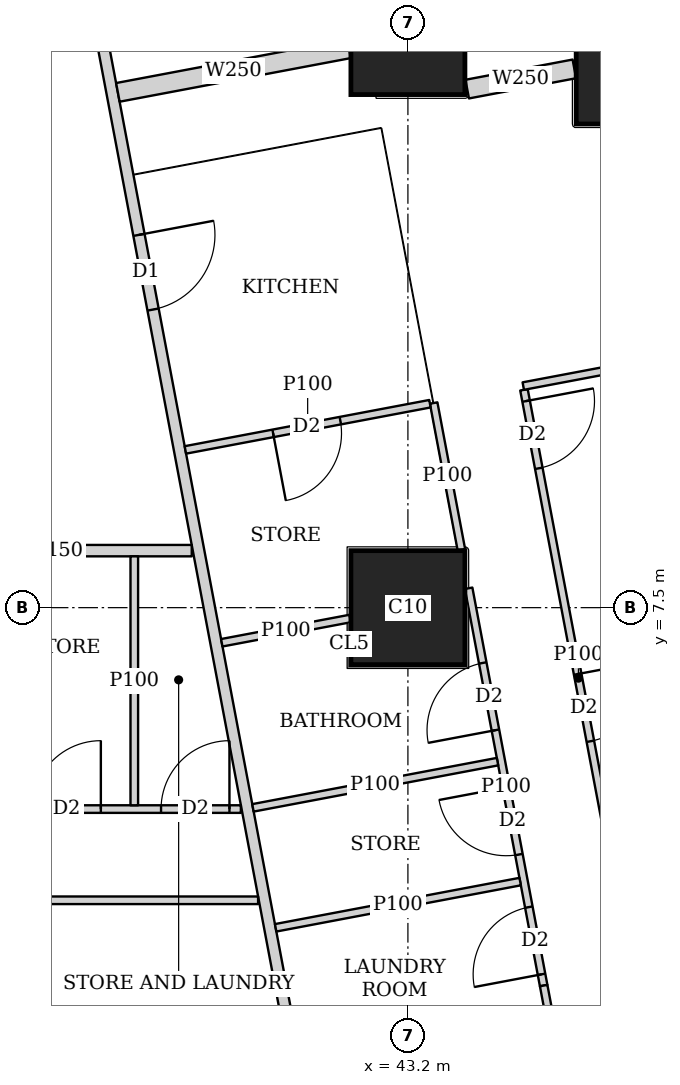
"""IFC4 building model, lengths in metres.
Left out: names, types, materials, properties, quantities, classifications, styles, units other than length and angle.
Written with IfcOpenShell. Run it as: python <this file> out.ifc"""

import sys

from ifc_helpers import new_model, si_unit, direction, frame, frame_2d, origin, origin_2d, place, context, subcontext, project, spatial, rectangle, extrude, element, fill, save


model = new_model("IFC4")
c1 = context("Model", 3, precision=1e-05, world=origin(), true_north=direction((0.0, 1.0)))
c2 = subcontext(c1, "Body", "Model", "MODEL_VIEW")
j1 = project(units=[si_unit("LENGTHUNIT", "METRE"), si_unit("PLANEANGLEUNIT", "RADIAN")], contexts=[c1])
p1 = place(None, origin())
s1 = spatial("IfcSite", under=j1, at=p1, CompositionType="ELEMENT")
p2 = place(p1, origin())
s2 = spatial("IfcBuilding", under=s1, at=p2, CompositionType="ELEMENT")
p3 = place(p2, frame((0.0, 0.0, 147.05)))
s3 = spatial("IfcBuildingStorey", under=s2, at=p3, CompositionType="ELEMENT", Elevation=147.05)
for number, where, z_axis, x_axis in (
    (1, (43.2, 7.5, 0.0), (0.0, 0.0, 1.0), (1.0, 0.0, 0.0)),
    (2, (43.2, 15.0, 0.0), (0.0, 0.0, 1.0), (1.0, 0.0, 0.0)),
):
    element("IfcColumn", number, at=place(p3, frame(where, z_axis=z_axis, x_axis=x_axis)), inside=s3, PredefinedType="COLUMN", context=c2, shape_type="SweptSolid", body=[
        extrude(rectangle(XDim=1.5, YDim=1.5, at=origin_2d()), origin(), (0.0, 0.0, 1.0), 3.75),
    ])
p4 = place(p3, frame((46.314, 14.763, 0.0), z_axis=(0.0, 0.0, 1.0), x_axis=(1.0, 0.0, 0.0)))
e3 = element("IfcColumn", 3, at=p4, inside=s3, PredefinedType="COLUMN", context=c2, shape_type="SweptSolid", body=[
    extrude(rectangle(XDim=1.8, YDim=1.8, at=origin_2d()), origin(), (0.0, 0.0, 1.0), 3.75),
])
p5 = place(p3, frame((50.653, 2.703, 0.0), z_axis=(0.0, 0.0, 1.0), x_axis=(-0.185612026696, 0.982623109613, 0.0)))
e4 = element("IfcWall", 4, at=p5, inside=s3, PredefinedType="SOLIDWALL", context=c2, shape_type="SweptSolid", body=[
    extrude(rectangle(XDim=41.393, YDim=0.2, at=frame_2d((20.697, 0.0))), origin(), (0.0, 0.0, 1.0), 3.5),
])
p6 = place(p5, frame((1.633, 0.0, 0.9)))
e5 = element("IfcOpeningElement", 5, at=p6, cuts=e4, PredefinedType="OPENING", context=c2, shape_type="SweptSolid", body=[
    extrude(rectangle(XDim=1.8, YDim=1.5, at=frame_2d((0.9, 0.75))), frame((0.0, 0.11, 0.0), z_axis=(0.0, -1.0, 0.0), x_axis=(1.0, 0.0, 0.0)), (0.0, 0.0, 1.0), 0.22),
])
p7 = place(p5, frame((6.032, 0.0, 0.9)))
e6 = element("IfcOpeningElement", 6, at=p7, cuts=e4, PredefinedType="OPENING", context=c2, shape_type="SweptSolid", body=[
    extrude(rectangle(XDim=1.8, YDim=1.5, at=frame_2d((0.9, 0.75))), frame((0.0, 0.11, 0.0), z_axis=(0.0, -1.0, 0.0), x_axis=(1.0, 0.0, 0.0)), (0.0, 0.0, 1.0), 0.22),
])
p8 = place(p5, frame((9.848, 0.0, 0.9)))
e7 = element("IfcOpeningElement", 7, at=p8, cuts=e4, PredefinedType="OPENING", context=c2, shape_type="SweptSolid", body=[
    extrude(rectangle(XDim=1.8, YDim=1.5, at=frame_2d((0.9, 0.75))), frame((0.0, 0.11, 0.0), z_axis=(0.0, -1.0, 0.0), x_axis=(1.0, 0.0, 0.0)), (0.0, 0.0, 1.0), 0.22),
])
p9 = place(p5, frame((13.664, 0.0, 0.9)))
e8 = element("IfcOpeningElement", 8, at=p9, cuts=e4, PredefinedType="OPENING", context=c2, shape_type="SweptSolid", body=[
    extrude(rectangle(XDim=1.8, YDim=1.5, at=frame_2d((0.9, 0.75))), frame((0.0, 0.11, 0.0), z_axis=(0.0, -1.0, 0.0), x_axis=(1.0, 0.0, 0.0)), (0.0, 0.0, 1.0), 0.22),
])
p10 = place(p5, frame((17.481, 0.0, 0.9)))
e9 = element("IfcOpeningElement", 9, at=p10, cuts=e4, PredefinedType="OPENING", context=c2, shape_type="SweptSolid", body=[
    extrude(rectangle(XDim=1.8, YDim=1.5, at=frame_2d((0.9, 0.75))), frame((0.0, 0.11, 0.0), z_axis=(0.0, -1.0, 0.0), x_axis=(1.0, 0.0, 0.0)), (0.0, 0.0, 1.0), 0.22),
])
p11 = place(p5, frame((21.297, 0.0, 0.9)))
e10 = element("IfcOpeningElement", 10, at=p11, cuts=e4, PredefinedType="OPENING", context=c2, shape_type="SweptSolid", body=[
    extrude(rectangle(XDim=1.8, YDim=1.5, at=frame_2d((0.9, 0.75))), frame((0.0, 0.11, 0.0), z_axis=(0.0, -1.0, 0.0), x_axis=(1.0, 0.0, 0.0)), (0.0, 0.0, 1.0), 0.22),
])
p12 = place(p5, frame((25.113, 0.0, 0.9)))
e11 = element("IfcOpeningElement", 11, at=p12, cuts=e4, PredefinedType="OPENING", context=c2, shape_type="SweptSolid", body=[
    extrude(rectangle(XDim=1.8, YDim=1.5, at=frame_2d((0.9, 0.75))), frame((0.0, 0.11, 0.0), z_axis=(0.0, -1.0, 0.0), x_axis=(1.0, 0.0, 0.0)), (0.0, 0.0, 1.0), 0.22),
])
p13 = place(p5, frame((28.93, 0.0, 0.9)))
e12 = element("IfcOpeningElement", 12, at=p13, cuts=e4, PredefinedType="OPENING", context=c2, shape_type="SweptSolid", body=[
    extrude(rectangle(XDim=1.8, YDim=1.5, at=frame_2d((0.9, 0.75))), frame((0.0, 0.11, 0.0), z_axis=(0.0, -1.0, 0.0), x_axis=(1.0, 0.0, 0.0)), (0.0, 0.0, 1.0), 0.22),
])
p14 = place(p5, frame((32.746, 0.0, 0.9)))
e13 = element("IfcOpeningElement", 13, at=p14, cuts=e4, PredefinedType="OPENING", context=c2, shape_type="SweptSolid", body=[
    extrude(rectangle(XDim=1.8, YDim=1.5, at=frame_2d((0.9, 0.75))), frame((0.0, 0.11, 0.0), z_axis=(0.0, -1.0, 0.0), x_axis=(1.0, 0.0, 0.0)), (0.0, 0.0, 1.0), 0.22),
])
p15 = place(p5, frame((36.481, 0.0, 0.9)))
e14 = element("IfcOpeningElement", 14, at=p15, cuts=e4, PredefinedType="OPENING", context=c2, shape_type="SweptSolid", body=[
    extrude(rectangle(XDim=1.8, YDim=1.5, at=frame_2d((0.9, 0.75))), frame((0.0, 0.11, 0.0), z_axis=(0.0, -1.0, 0.0), x_axis=(1.0, 0.0, 0.0)), (0.0, 0.0, 1.0), 0.22),
])
p16 = place(p3, frame((40.356, 8.25, 0.0), z_axis=(0.0, 0.0, 1.0), x_axis=(-1.0, 0.0, 0.0)))
e15 = element("IfcWall", 15, at=p16, inside=s3, PredefinedType="SOLIDWALL", context=c2, shape_type="SweptSolid", body=[
    extrude(rectangle(XDim=3.605, YDim=0.15, at=frame_2d((1.802, 0.0))), origin(), (0.0, 0.0, 1.0), 3.5),
])
p17 = place(p3, frame((33.877, 43.029, 0.0), z_axis=(0.0, 0.0, 1.0), x_axis=(0.185596841028, -0.98262597798, 0.0)))
e16 = element("IfcWall", 16, at=p17, inside=s3, PredefinedType="SOLIDWALL", context=c2, shape_type="SweptSolid", body=[
    extrude(rectangle(XDim=41.66, YDim=0.15, at=frame_2d((20.83, 0.0))), origin(), (0.0, 0.0, 1.0), 2.5),
])
p18 = place(p17, frame((12.57, 0.0, 0.0)))
e17 = element("IfcOpeningElement", 17, at=p18, cuts=e16, PredefinedType="OPENING", context=c2, shape_type="SweptSolid", body=[
    extrude(rectangle(XDim=1.0, YDim=2.1, at=frame_2d((0.5, 1.05))), frame((0.0, 0.085, 0.0), z_axis=(0.0, -1.0, 0.0), x_axis=(1.0, 0.0, 0.0)), (0.0, 0.0, 1.0), 0.17),
])
p19 = place(p17, frame((16.386, 0.0, 0.0)))
e18 = element("IfcOpeningElement", 18, at=p19, cuts=e16, PredefinedType="OPENING", context=c2, shape_type="SweptSolid", body=[
    extrude(rectangle(XDim=1.0, YDim=2.1, at=frame_2d((0.5, 1.05))), frame((0.0, 0.085, 0.0), z_axis=(0.0, -1.0, 0.0), x_axis=(1.0, 0.0, 0.0)), (0.0, 0.0, 1.0), 0.17),
])
p20 = place(p17, frame((31.166, 0.0, 0.0)))
e19 = element("IfcOpeningElement", 19, at=p20, cuts=e16, PredefinedType="OPENING", context=c2, shape_type="SweptSolid", body=[
    extrude(rectangle(XDim=1.0, YDim=2.1, at=frame_2d((0.5, 1.05))), frame((0.0, 0.085, 0.0), z_axis=(0.0, -1.0, 0.0), x_axis=(1.0, 0.0, 0.0)), (0.0, 0.0, 1.0), 0.17),
])
p21 = place(p3, frame((41.229, 3.65, 0.0), z_axis=(0.0, 0.0, 1.0), x_axis=(-1.0, 0.0, 0.0)))
e20 = element("IfcWall", 20, at=p21, inside=s3, PredefinedType="PARTITIONING", context=c2, shape_type="SweptSolid", body=[
    extrude(rectangle(XDim=12.429, YDim=0.1, at=frame_2d((6.214, 0.0))), origin(), (0.0, 0.0, 1.0), 3.5),
])
p22 = place(p21, frame((11.329, 0.0, 0.0)))
e21 = element("IfcOpeningElement", 21, at=p22, cuts=e20, PredefinedType="OPENING", context=c2, shape_type="SweptSolid", body=[
    extrude(rectangle(XDim=0.9, YDim=2.1, at=frame_2d((0.45, 1.05))), frame((0.0, 0.06, 0.0), z_axis=(0.0, -1.0, 0.0), x_axis=(1.0, 0.0, 0.0)), (0.0, 0.0, 1.0), 0.12),
])
p23 = place(p21, frame((7.729, 0.0, 0.0)))
e22 = element("IfcOpeningElement", 22, at=p23, cuts=e20, PredefinedType="OPENING", context=c2, shape_type="SweptSolid", body=[
    extrude(rectangle(XDim=0.9, YDim=2.1, at=frame_2d((0.45, 1.05))), frame((0.0, 0.06, 0.0), z_axis=(0.0, -1.0, 0.0), x_axis=(1.0, 0.0, 0.0)), (0.0, 0.0, 1.0), 0.12),
])
p24 = place(p21, frame((4.129, 0.0, 0.0)))
e23 = element("IfcOpeningElement", 23, at=p24, cuts=e20, PredefinedType="OPENING", context=c2, shape_type="SweptSolid", body=[
    extrude(rectangle(XDim=0.9, YDim=2.1, at=frame_2d((0.45, 1.05))), frame((0.0, 0.06, 0.0), z_axis=(0.0, -1.0, 0.0), x_axis=(1.0, 0.0, 0.0)), (0.0, 0.0, 1.0), 0.12),
])
p25 = place(p3, frame((41.002, 4.85, 0.0), z_axis=(0.0, 0.0, 1.0), x_axis=(-1.0, 0.0, 0.0)))
e24 = element("IfcWall", 24, at=p25, inside=s3, PredefinedType="PARTITIONING", context=c2, shape_type="SweptSolid", body=[
    extrude(rectangle(XDim=12.202, YDim=0.1, at=frame_2d((6.101, 0.0))), origin(), (0.0, 0.0, 1.0), 3.5),
])
p26 = place(p25, frame((10.647, 0.0, 0.0)))
e25 = element("IfcOpeningElement", 25, at=p26, cuts=e24, PredefinedType="OPENING", context=c2, shape_type="SweptSolid", body=[
    extrude(rectangle(XDim=0.9, YDim=2.1, at=frame_2d((0.45, 1.05))), frame((0.0, 0.06, 0.0), z_axis=(0.0, -1.0, 0.0), x_axis=(1.0, 0.0, 0.0)), (0.0, 0.0, 1.0), 0.12),
])
p27 = place(p25, frame((7.352, 0.0, 0.0)))
e26 = element("IfcOpeningElement", 26, at=p27, cuts=e24, PredefinedType="OPENING", context=c2, shape_type="SweptSolid", body=[
    extrude(rectangle(XDim=0.9, YDim=2.1, at=frame_2d((0.45, 1.05))), frame((0.0, 0.06, 0.0), z_axis=(0.0, -1.0, 0.0), x_axis=(1.0, 0.0, 0.0)), (0.0, 0.0, 1.0), 0.12),
])
p28 = place(p25, frame((3.642, 0.0, 0.0)))
e27 = element("IfcOpeningElement", 27, at=p28, cuts=e24, PredefinedType="OPENING", context=c2, shape_type="SweptSolid", body=[
    extrude(rectangle(XDim=0.9, YDim=2.1, at=frame_2d((0.45, 1.05))), frame((0.0, 0.06, 0.0), z_axis=(0.0, -1.0, 0.0), x_axis=(1.0, 0.0, 0.0)), (0.0, 0.0, 1.0), 0.12),
])
p29 = place(p25, frame((0.15, 0.0, 0.0)))
e28 = element("IfcOpeningElement", 28, at=p29, cuts=e24, PredefinedType="OPENING", context=c2, shape_type="SweptSolid", body=[
    extrude(rectangle(XDim=0.9, YDim=2.1, at=frame_2d((0.45, 1.05))), frame((0.0, 0.06, 0.0), z_axis=(0.0, -1.0, 0.0), x_axis=(1.0, 0.0, 0.0)), (0.0, 0.0, 1.0), 0.12),
])
p30 = place(p25, frame((8.847, 0.0, 0.0)))
e29 = element("IfcOpeningElement", 29, at=p30, cuts=e24, PredefinedType="OPENING", context=c2, shape_type="SweptSolid", body=[
    extrude(rectangle(XDim=0.9, YDim=2.1, at=frame_2d((0.45, 1.05))), frame((0.0, 0.06, 0.0), z_axis=(0.0, -1.0, 0.0), x_axis=(1.0, 0.0, 0.0)), (0.0, 0.0, 1.0), 0.12),
])
p31 = place(p25, frame((5.552, 0.0, 0.0)))
e30 = element("IfcOpeningElement", 30, at=p31, cuts=e24, PredefinedType="OPENING", context=c2, shape_type="SweptSolid", body=[
    extrude(rectangle(XDim=0.9, YDim=2.1, at=frame_2d((0.45, 1.05))), frame((0.0, 0.06, 0.0), z_axis=(0.0, -1.0, 0.0), x_axis=(1.0, 0.0, 0.0)), (0.0, 0.0, 1.0), 0.12),
])
p32 = place(p25, frame((1.842, 0.0, 0.0)))
e31 = element("IfcOpeningElement", 31, at=p32, cuts=e24, PredefinedType="OPENING", context=c2, shape_type="SweptSolid", body=[
    extrude(rectangle(XDim=0.9, YDim=2.1, at=frame_2d((0.45, 1.05))), frame((0.0, 0.06, 0.0), z_axis=(0.0, -1.0, 0.0), x_axis=(1.0, 0.0, 0.0)), (0.0, 0.0, 1.0), 0.12),
])
p33 = place(p3, frame((39.6, 4.9, 0.0), z_axis=(0.0, 0.0, 1.0), x_axis=(0.0, 1.0, 0.0)))
e32 = element("IfcWall", 32, at=p33, inside=s3, PredefinedType="PARTITIONING", context=c2, shape_type="SweptSolid", body=[
    extrude(rectangle(XDim=3.275, YDim=0.1, at=frame_2d((1.638, 0.0))), origin(), (0.0, 0.0, 1.0), 3.5),
])
p34 = place(p3, frame((44.727, 10.366, 0.0), z_axis=(0.0, 0.0, 1.0), x_axis=(0.185578957652, -0.982629355595, 0.0)))
e33 = element("IfcWall", 33, at=p34, inside=s3, PredefinedType="PARTITIONING", context=c2, shape_type="SweptSolid", body=[
    extrude(rectangle(XDim=7.721, YDim=0.1, at=frame_2d((3.86, 0.0))), origin(), (0.0, 0.0, 1.0), 3.5),
])
p35 = place(p34, frame((0.151, 0.0, 0.0)))
e34 = element("IfcOpeningElement", 34, at=p35, cuts=e33, PredefinedType="OPENING", context=c2, shape_type="SweptSolid", body=[
    extrude(rectangle(XDim=0.9, YDim=2.1, at=frame_2d((0.45, 1.05))), frame((0.0, 0.06, 0.0), z_axis=(0.0, -1.0, 0.0), x_axis=(1.0, 0.0, 0.0)), (0.0, 0.0, 1.0), 0.12),
])
p36 = place(p34, frame((3.806, 0.0, 0.0)))
e35 = element("IfcOpeningElement", 35, at=p36, cuts=e33, PredefinedType="OPENING", context=c2, shape_type="SweptSolid", body=[
    extrude(rectangle(XDim=0.9, YDim=2.1, at=frame_2d((0.45, 1.05))), frame((0.0, 0.06, 0.0), z_axis=(0.0, -1.0, 0.0), x_axis=(1.0, 0.0, 0.0)), (0.0, 0.0, 1.0), 0.12),
])
p37 = place(p3, frame((43.539, 10.192, 0.0), z_axis=(0.0, 0.0, 1.0), x_axis=(0.18564540894, -0.982616803306, 0.0)))
e36 = element("IfcWall", 36, at=p37, inside=s3, PredefinedType="PARTITIONING", context=c2, shape_type="SweptSolid", body=[
    extrude(rectangle(XDim=1.966, YDim=0.1, at=frame_2d((0.983, 0.0))), origin(), (0.0, 0.0, 1.0), 3.5),
])
p38 = place(p3, frame((43.999, 7.755, 0.0), z_axis=(0.0, 0.0, 1.0), x_axis=(0.185565904578, -0.982631820703, 0.0)))
e37 = element("IfcWall", 37, at=p38, inside=s3, PredefinedType="PARTITIONING", context=c2, shape_type="SweptSolid", body=[
    extrude(rectangle(XDim=5.319, YDim=0.1, at=frame_2d((2.66, 0.0))), origin(), (0.0, 0.0, 1.0), 3.5),
])
p39 = place(p38, frame((1.0, 0.0, 0.0)))
e38 = element("IfcOpeningElement", 38, at=p39, cuts=e37, PredefinedType="OPENING", context=c2, shape_type="SweptSolid", body=[
    extrude(rectangle(XDim=0.9, YDim=2.1, at=frame_2d((0.45, 1.05))), frame((0.0, 0.06, 0.0), z_axis=(0.0, -1.0, 0.0), x_axis=(1.0, 0.0, 0.0)), (0.0, 0.0, 1.0), 0.12),
])
p40 = place(p38, frame((4.269, 0.0, 0.0)))
e39 = element("IfcOpeningElement", 39, at=p40, cuts=e37, PredefinedType="OPENING", context=c2, shape_type="SweptSolid", body=[
    extrude(rectangle(XDim=0.9, YDim=2.1, at=frame_2d((0.45, 1.05))), frame((0.0, 0.06, 0.0), z_axis=(0.0, -1.0, 0.0), x_axis=(1.0, 0.0, 0.0)), (0.0, 0.0, 1.0), 0.12),
])
p41 = place(p38, frame((2.665, 0.0, 0.0)))
e40 = element("IfcOpeningElement", 40, at=p41, cuts=e37, PredefinedType="OPENING", context=c2, shape_type="SweptSolid", body=[
    extrude(rectangle(XDim=0.9, YDim=2.1, at=frame_2d((0.45, 1.05))), frame((0.0, 0.06, 0.0), z_axis=(0.0, -1.0, 0.0), x_axis=(1.0, 0.0, 0.0)), (0.0, 0.0, 1.0), 0.12),
])
p42 = place(p3, frame((44.986, 2.528, 0.0), z_axis=(0.0, 0.0, 1.0), x_axis=(0.18584218627, -0.982579605835, 0.0)))
e41 = element("IfcWall", 41, at=p42, inside=s3, PredefinedType="PARTITIONING", context=c2, shape_type="SweptSolid", body=[
    extrude(rectangle(XDim=1.802, YDim=0.1, at=frame_2d((0.901, 0.0))), origin(), (0.0, 0.0, 1.0), 2.1),
])
p43 = place(p3, frame((48.943, 11.213, 0.0), z_axis=(0.0, 0.0, 1.0), x_axis=(-0.982633535512, -0.185556823879, 0.0)))
e42 = element("IfcWall", 42, at=p43, inside=s3, PredefinedType="PARTITIONING", context=c2, shape_type="SweptSolid", body=[
    extrude(rectangle(XDim=4.3, YDim=0.1, at=frame_2d((2.15, 0.0))), origin(), (0.0, 0.0, 1.0), 2.1),
])
p44 = place(p3, frame((46.82, 7.091, 0.0), z_axis=(0.0, 0.0, 1.0), x_axis=(-0.982689853246, -0.185258339427, 0.0)))
e43 = element("IfcWall", 43, at=p44, inside=s3, PredefinedType="PARTITIONING", context=c2, shape_type="SweptSolid", body=[
    extrude(rectangle(XDim=1.398, YDim=0.1, at=frame_2d((0.699, 0.0))), origin(), (0.0, 0.0, 1.0), 3.5),
])
p45 = place(p3, frame((43.49, 10.183, 0.0), z_axis=(0.0, 0.0, 1.0), x_axis=(-0.982607026909, -0.185697147715, 0.0)))
e44 = element("IfcWall", 44, at=p45, inside=s3, PredefinedType="PARTITIONING", context=c2, shape_type="SweptSolid", body=[
    extrude(rectangle(XDim=3.275, YDim=0.1, at=frame_2d((1.637, 0.0))), origin(), (0.0, 0.0, 1.0), 3.5),
])
p46 = place(p45, frame((1.2, 0.0, 0.0)))
e45 = element("IfcOpeningElement", 45, at=p46, cuts=e44, PredefinedType="OPENING", context=c2, shape_type="SweptSolid", body=[
    extrude(rectangle(XDim=0.9, YDim=2.1, at=frame_2d((0.45, 1.05))), frame((0.0, 0.06, 0.0), z_axis=(0.0, -1.0, 0.0), x_axis=(1.0, 0.0, 0.0)), (0.0, 0.0, 1.0), 0.12),
])
p47 = place(p3, frame((42.44, 7.357, 0.0), z_axis=(0.0, 0.0, 1.0), x_axis=(-0.982643094077, -0.185506198448, 0.0)))
e46 = element("IfcWall", 46, at=p47, inside=s3, PredefinedType="PARTITIONING", context=c2, shape_type="SweptSolid", body=[
    extrude(rectangle(XDim=1.719, YDim=0.1, at=frame_2d((0.859, 0.0))), origin(), (0.0, 0.0, 1.0), 3.5),
])
p48 = place(p3, frame((44.677, 3.896, 0.0), z_axis=(0.0, 0.0, 1.0), x_axis=(-0.982610347627, -0.185679575441, 0.0)))
e47 = element("IfcWall", 47, at=p48, inside=s3, PredefinedType="PARTITIONING", context=c2, shape_type="SweptSolid", body=[
    extrude(rectangle(XDim=3.274, YDim=0.1, at=frame_2d((1.637, 0.0))), origin(), (0.0, 0.0, 1.0), 3.5),
])
p49 = place(p3, frame((44.379, 5.474, 0.0), z_axis=(0.0, 0.0, 1.0), x_axis=(-0.982607026909, -0.185697147715, 0.0)))
e48 = element("IfcWall", 48, at=p49, inside=s3, PredefinedType="PARTITIONING", context=c2, shape_type="SweptSolid", body=[
    extrude(rectangle(XDim=3.275, YDim=0.1, at=frame_2d((1.637, 0.0))), origin(), (0.0, 0.0, 1.0), 3.5),
])
p50 = place(p3, frame((45.39, 14.588, 0.0), z_axis=(0.0, 0.0, 1.0), x_axis=(-0.982680951688, -0.18530555089, 0.0)))
e49 = element("IfcWall", 49, at=p50, inside=s3, PredefinedType="SOLIDWALL", context=c2, shape_type="SweptSolid", body=[
    extrude(rectangle(XDim=1.435, YDim=0.25, at=frame_2d((0.717, 0.0))), origin(), (0.0, 0.0, 1.0), 2.1),
])
p51 = place(p3, frame((42.426, 14.853, 0.0), z_axis=(0.0, 0.0, 1.0), x_axis=(-0.982660840416, -0.185412169809, 0.0)))
e50 = element("IfcWall", 50, at=p51, inside=s3, PredefinedType="SOLIDWALL", context=c2, shape_type="SweptSolid", body=[
    extrude(rectangle(XDim=3.096, YDim=0.25, at=frame_2d((1.548, 0.0))), origin(), (0.0, 0.0, 1.0), 3.5),
])
p52 = place(p29, origin())
e51 = element("IfcDoor", 51, at=p52, inside=s3, OperationType="SINGLE_SWING_RIGHT", PredefinedType="DOOR", context=c2, shape_type="SweptSolid", body=[
    extrude(rectangle(XDim=0.9, YDim=2.1, at=frame_2d((0.45, 1.05))), frame((0.0, 0.025, 0.0), z_axis=(0.0, -1.0, 0.0), x_axis=(1.0, 0.0, 0.0)), (0.0, 0.0, 1.0), 0.05),
])
fill(e28, e51)
p53 = place(p32, origin())
e52 = element("IfcDoor", 52, at=p53, inside=s3, OperationType="SINGLE_SWING_RIGHT", PredefinedType="DOOR", context=c2, shape_type="SweptSolid", body=[
    extrude(rectangle(XDim=0.9, YDim=2.1, at=frame_2d((0.45, 1.05))), frame((0.0, 0.025, 0.0), z_axis=(0.0, -1.0, 0.0), x_axis=(1.0, 0.0, 0.0)), (0.0, 0.0, 1.0), 0.05),
])
fill(e31, e52)
p54 = place(p35, origin())
e53 = element("IfcDoor", 53, at=p54, inside=s3, OperationType="SINGLE_SWING_LEFT", PredefinedType="DOOR", context=c2, shape_type="SweptSolid", body=[
    extrude(rectangle(XDim=0.9, YDim=2.1, at=frame_2d((0.45, 1.05))), frame((0.0, 0.025, 0.0), z_axis=(0.0, -1.0, 0.0), x_axis=(1.0, 0.0, 0.0)), (0.0, 0.0, 1.0), 0.05),
])
fill(e34, e53)
p55 = place(p36, origin())
e54 = element("IfcDoor", 54, at=p55, inside=s3, OperationType="SINGLE_SWING_LEFT", PredefinedType="DOOR", context=c2, shape_type="SweptSolid", body=[
    extrude(rectangle(XDim=0.9, YDim=2.1, at=frame_2d((0.45, 1.05))), frame((0.0, 0.025, 0.0), z_axis=(0.0, -1.0, 0.0), x_axis=(1.0, 0.0, 0.0)), (0.0, 0.0, 1.0), 0.05),
])
fill(e35, e54)
p56 = place(p39, origin())
e55 = element("IfcDoor", 55, at=p56, inside=s3, OperationType="SINGLE_SWING_LEFT", PredefinedType="DOOR", context=c2, shape_type="SweptSolid", body=[
    extrude(rectangle(XDim=0.9, YDim=2.1, at=frame_2d((0.45, 1.05))), frame((0.0, 0.025, 0.0), z_axis=(0.0, -1.0, 0.0), x_axis=(1.0, 0.0, 0.0)), (0.0, 0.0, 1.0), 0.05),
])
fill(e38, e55)
p57 = place(p40, origin())
e56 = element("IfcDoor", 56, at=p57, inside=s3, OperationType="SINGLE_SWING_LEFT", PredefinedType="DOOR", context=c2, shape_type="SweptSolid", body=[
    extrude(rectangle(XDim=0.9, YDim=2.1, at=frame_2d((0.45, 1.05))), frame((0.0, 0.025, 0.0), z_axis=(0.0, -1.0, 0.0), x_axis=(1.0, 0.0, 0.0)), (0.0, 0.0, 1.0), 0.05),
])
fill(e39, e56)
p58 = place(p41, origin())
e57 = element("IfcDoor", 57, at=p58, inside=s3, OperationType="SINGLE_SWING_RIGHT", PredefinedType="DOOR", context=c2, shape_type="SweptSolid", body=[
    extrude(rectangle(XDim=0.9, YDim=2.1, at=frame_2d((0.45, 1.05))), frame((0.0, 0.025, 0.0), z_axis=(0.0, -1.0, 0.0), x_axis=(1.0, 0.0, 0.0)), (0.0, 0.0, 1.0), 0.05),
])
fill(e40, e57)
p59 = place(p20, origin())
e58 = element("IfcDoor", 58, at=p59, inside=s3, OperationType="SINGLE_SWING_LEFT", PredefinedType="DOOR", context=c2, shape_type="SweptSolid", body=[
    extrude(rectangle(XDim=1.0, YDim=2.1, at=frame_2d((0.5, 1.05))), frame((0.0, 0.025, 0.0), z_axis=(0.0, -1.0, 0.0), x_axis=(1.0, 0.0, 0.0)), (0.0, 0.0, 1.0), 0.05),
])
fill(e19, e58)
p60 = place(p46, origin())
e59 = element("IfcDoor", 59, at=p60, inside=s3, OperationType="SINGLE_SWING_RIGHT", PredefinedType="DOOR", context=c2, shape_type="SweptSolid", body=[
    extrude(rectangle(XDim=0.9, YDim=2.1, at=frame_2d((0.45, 1.05))), frame((0.0, 0.025, 0.0), z_axis=(0.0, -1.0, 0.0), x_axis=(1.0, 0.0, 0.0)), (0.0, 0.0, 1.0), 0.05),
])
fill(e45, e59)
save(model, sys.argv[1])
